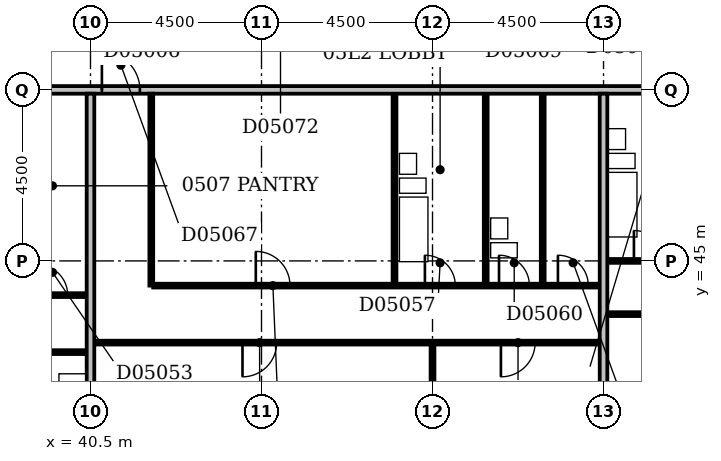
"""IFC4 building model, lengths in metres.
Left out: names, types, materials, properties, quantities, classifications, styles, units other than length and angle.
Written with IfcOpenShell. Run it as: python <this file> out.ifc"""

import sys

from ifc_helpers import new_model, si_unit, direction, frame, frame_2d, origin, place, context, subcontext, project, spatial, rectangle, extrude, element, fill, save


model = new_model("IFC4")
c1 = context("Model", 3, precision=1e-05, world=origin(), true_north=direction((0.0, 1.0)))
c2 = subcontext(c1, "Body", "Model", "MODEL_VIEW")
j1 = project(units=[si_unit("LENGTHUNIT", "METRE"), si_unit("PLANEANGLEUNIT", "RADIAN")], contexts=[c1])
p1 = place(None, origin())
s1 = spatial("IfcSite", under=j1, at=p1, CompositionType="ELEMENT")
p2 = place(p1, origin())
s2 = spatial("IfcBuilding", under=s1, at=p2, CompositionType="ELEMENT")
p3 = place(p2, frame((0.0, 0.0, 29.0)))
s3 = spatial("IfcBuildingStorey", under=s2, at=p3, CompositionType="ELEMENT", Elevation=29.0)
p4 = place(p3, frame((40.5, 36.6, 0.0), z_axis=(0.0, 0.0, 1.0), x_axis=(0.0, 1.0, 0.0)))
e1 = element("IfcWall", 1, at=p4, inside=s3, PredefinedType="PARTITIONING", context=c2, shape_type="SweptSolid", body=[
    extrude(rectangle(XDim=12.8, YDim=0.2, at=frame_2d((6.4, 0.0))), origin(), (0.0, 0.0, 1.0), 3.3),
])
p5 = place(p3, frame((49.5, 36.6, 0.0), z_axis=(0.0, 0.0, 1.0), x_axis=(0.0, 1.0, 0.0)))
e2 = element("IfcWall", 2, at=p5, inside=s3, PredefinedType="PARTITIONING", context=c2, shape_type="SweptSolid", body=[
    extrude(rectangle(XDim=6.2, YDim=0.1, at=frame_2d((3.1, 0.0))), origin(), (0.0, 0.0, 1.0), 3.3),
])
p6 = place(p3, frame((54.0, 36.6, 0.0), z_axis=(0.0, 0.0, 1.0), x_axis=(0.0, 1.0, 0.0)))
e3 = element("IfcWall", 3, at=p6, inside=s3, PredefinedType="PARTITIONING", context=c2, shape_type="SweptSolid", body=[
    extrude(rectangle(XDim=12.8, YDim=0.2, at=frame_2d((6.4, 0.0))), origin(), (0.0, 0.0, 1.0), 2.6),
])
p7 = place(p3, frame((22.6, 42.6, 0.0), z_axis=(0.0, 0.0, 1.0), x_axis=(1.0, 0.0, 0.0)))
e4 = element("IfcWall", 4, at=p7, inside=s3, PredefinedType="PARTITIONING", context=c2, shape_type="SweptSolid", body=[
    extrude(rectangle(XDim=17.8, YDim=0.1, at=frame_2d((8.9, 0.0))), origin(), (0.0, 0.0, 1.0), 3.3),
])
p8 = place(p7, frame((3.9, 0.0, 0.0)))
e5 = element("IfcOpeningElement", 5, at=p8, cuts=e4, PredefinedType="OPENING", context=c2, shape_type="SweptSolid", body=[
    extrude(rectangle(XDim=0.9, YDim=2.1, at=frame_2d((0.45, 1.05))), frame((0.0, 0.062, 0.0), z_axis=(0.0, -1.0, 0.0), x_axis=(1.0, 0.0, 0.0)), (0.0, 0.0, 1.0), 0.124),
])
p9 = place(p7, frame((10.7, 0.0, 0.0)))
e6 = element("IfcOpeningElement", 6, at=p9, cuts=e4, PredefinedType="OPENING", context=c2, shape_type="SweptSolid", body=[
    extrude(rectangle(XDim=0.9, YDim=2.1, at=frame_2d((0.45, 1.05))), frame((0.0, 0.062, 0.0), z_axis=(0.0, -1.0, 0.0), x_axis=(1.0, 0.0, 0.0)), (0.0, 0.0, 1.0), 0.124),
])
p10 = place(p7, frame((14.05, 0.0, 0.0)))
e7 = element("IfcOpeningElement", 7, at=p10, cuts=e4, PredefinedType="OPENING", context=c2, shape_type="SweptSolid", body=[
    extrude(rectangle(XDim=0.9, YDim=2.1, at=frame_2d((0.45, 1.05))), frame((0.0, 0.062, 0.0), z_axis=(0.0, -1.0, 0.0), x_axis=(1.0, 0.0, 0.0)), (0.0, 0.0, 1.0), 0.124),
])
p11 = place(p3, frame((40.6, 42.85, 0.0), z_axis=(0.0, 0.0, 1.0), x_axis=(1.0, 0.0, 0.0)))
e8 = element("IfcWall", 8, at=p11, inside=s3, PredefinedType="PARTITIONING", context=c2, shape_type="SweptSolid", body=[
    extrude(rectangle(XDim=13.3, YDim=0.1, at=frame_2d((6.65, 0.0))), origin(), (0.0, 0.0, 1.0), 3.3),
])
p12 = place(p11, frame((3.9, 0.0, 0.0)))
e9 = element("IfcOpeningElement", 9, at=p12, cuts=e8, PredefinedType="OPENING", context=c2, shape_type="SweptSolid", body=[
    extrude(rectangle(XDim=0.9, YDim=2.1, at=frame_2d((0.45, 1.05))), frame((0.0, 0.062, 0.0), z_axis=(0.0, -1.0, 0.0), x_axis=(1.0, 0.0, 0.0)), (0.0, 0.0, 1.0), 0.124),
])
p13 = place(p11, frame((10.7, 0.0, 0.0)))
e10 = element("IfcOpeningElement", 10, at=p13, cuts=e8, PredefinedType="OPENING", context=c2, shape_type="SweptSolid", body=[
    extrude(rectangle(XDim=0.9, YDim=2.1, at=frame_2d((0.45, 1.05))), frame((0.0, 0.062, 0.0), z_axis=(0.0, -1.0, 0.0), x_axis=(1.0, 0.0, 0.0)), (0.0, 0.0, 1.0), 0.124),
])
p14 = place(p3, frame((54.1, 43.6, 0.0), z_axis=(0.0, 0.0, 1.0), x_axis=(1.0, 0.0, 0.0)))
e11 = element("IfcWall", 11, at=p14, inside=s3, PredefinedType="PARTITIONING", context=c2, shape_type="SweptSolid", body=[
    extrude(rectangle(XDim=8.8, YDim=0.1, at=frame_2d((4.4, 0.0))), origin(), (0.0, 0.0, 1.0), 3.3),
])
p15 = place(p14, frame((1.7, 0.0, 0.0)))
e12 = element("IfcOpeningElement", 12, at=p15, cuts=e11, PredefinedType="OPENING", context=c2, shape_type="SweptSolid", body=[
    extrude(rectangle(XDim=0.9, YDim=2.1, at=frame_2d((0.45, 1.05))), frame((0.0, 0.062, 0.0), z_axis=(0.0, -1.0, 0.0), x_axis=(1.0, 0.0, 0.0)), (0.0, 0.0, 1.0), 0.124),
])
p16 = place(p14, frame((6.2, 0.0, 0.0)))
e13 = element("IfcOpeningElement", 13, at=p16, cuts=e11, PredefinedType="OPENING", context=c2, shape_type="SweptSolid", body=[
    extrude(rectangle(XDim=0.9, YDim=2.1, at=frame_2d((0.45, 1.05))), frame((0.0, 0.062, 0.0), z_axis=(0.0, -1.0, 0.0), x_axis=(1.0, 0.0, 0.0)), (0.0, 0.0, 1.0), 0.124),
])
p17 = place(p3, frame((31.05, 44.1, 0.0), z_axis=(0.0, 0.0, 1.0), x_axis=(1.0, 0.0, 0.0)))
e14 = element("IfcWall", 14, at=p17, inside=s3, PredefinedType="PARTITIONING", context=c2, shape_type="SweptSolid", body=[
    extrude(rectangle(XDim=9.35, YDim=0.1, at=frame_2d((4.675, 0.0))), origin(), (0.0, 0.0, 1.0), 3.3),
])
p18 = place(p17, frame((0.75, 0.0, 0.0)))
e15 = element("IfcOpeningElement", 15, at=p18, cuts=e14, PredefinedType="OPENING", context=c2, shape_type="SweptSolid", body=[
    extrude(rectangle(XDim=0.8, YDim=2.1, at=frame_2d((0.4, 1.05))), frame((0.0, 0.062, 0.0), z_axis=(0.0, -1.0, 0.0), x_axis=(1.0, 0.0, 0.0)), (0.0, 0.0, 1.0), 0.124),
])
p19 = place(p17, frame((8.05, 0.0, 0.0)))
e16 = element("IfcOpeningElement", 16, at=p19, cuts=e14, PredefinedType="OPENING", context=c2, shape_type="SweptSolid", body=[
    extrude(rectangle(XDim=0.8, YDim=2.1, at=frame_2d((0.4, 1.05))), frame((0.0, 0.062, 0.0), z_axis=(0.0, -1.0, 0.0), x_axis=(1.0, 0.0, 0.0)), (0.0, 0.0, 1.0), 0.124),
])
p20 = place(p17, frame((4.25, 0.0, 0.0)))
e17 = element("IfcOpeningElement", 17, at=p20, cuts=e14, PredefinedType="OPENING", context=c2, shape_type="SweptSolid", body=[
    extrude(rectangle(XDim=0.8, YDim=2.1, at=frame_2d((0.4, 1.05))), frame((0.0, 0.062, 0.0), z_axis=(0.0, -1.0, 0.0), x_axis=(1.0, 0.0, 0.0)), (0.0, 0.0, 1.0), 0.124),
])
p21 = place(p17, frame((6.05, 0.0, 0.0)))
e18 = element("IfcOpeningElement", 18, at=p21, cuts=e14, PredefinedType="OPENING", context=c2, shape_type="SweptSolid", body=[
    extrude(rectangle(XDim=0.8, YDim=2.1, at=frame_2d((0.4, 1.05))), frame((0.0, 0.062, 0.0), z_axis=(0.0, -1.0, 0.0), x_axis=(1.0, 0.0, 0.0)), (0.0, 0.0, 1.0), 0.124),
])
p22 = place(p17, frame((2.7, 0.0, 0.0)))
e19 = element("IfcOpeningElement", 19, at=p22, cuts=e14, PredefinedType="OPENING", context=c2, shape_type="SweptSolid", body=[
    extrude(rectangle(XDim=0.8, YDim=2.1, at=frame_2d((0.4, 1.05))), frame((0.0, 0.062, 0.0), z_axis=(0.0, -1.0, 0.0), x_axis=(1.0, 0.0, 0.0)), (0.0, 0.0, 1.0), 0.124),
])
p23 = place(p3, frame((42.1, 44.35, 0.0), z_axis=(0.0, 0.0, 1.0), x_axis=(0.0, 1.0, 0.0)))
e20 = element("IfcWall", 20, at=p23, inside=s3, PredefinedType="PARTITIONING", context=c2, shape_type="SweptSolid", body=[
    extrude(rectangle(XDim=5.05, YDim=0.1, at=frame_2d((2.525, 0.0))), origin(), (0.0, 0.0, 1.0), 3.3),
])
p24 = place(p3, frame((42.15, 44.35, 0.0), z_axis=(0.0, 0.0, 1.0), x_axis=(1.0, 0.0, 0.0)))
e21 = element("IfcWall", 21, at=p24, inside=s3, PredefinedType="PARTITIONING", context=c2, shape_type="SweptSolid", body=[
    extrude(rectangle(XDim=11.75, YDim=0.1, at=frame_2d((5.875, 0.0))), origin(), (0.0, 0.0, 1.0), 3.3),
])
p25 = place(p24, frame((7.15, 0.0, 0.0)))
e22 = element("IfcOpeningElement", 22, at=p25, cuts=e21, PredefinedType="OPENING", context=c2, shape_type="SweptSolid", body=[
    extrude(rectangle(XDim=0.8, YDim=2.1, at=frame_2d((0.4, 1.05))), frame((0.0, 0.062, 0.0), z_axis=(0.0, -1.0, 0.0), x_axis=(1.0, 0.0, 0.0)), (0.0, 0.0, 1.0), 0.124),
])
p26 = place(p24, frame((2.7, 0.0, 0.0)))
e23 = element("IfcOpeningElement", 23, at=p26, cuts=e21, PredefinedType="OPENING", context=c2, shape_type="SweptSolid", body=[
    extrude(rectangle(XDim=0.9, YDim=2.1, at=frame_2d((0.45, 1.05))), frame((0.0, 0.062, 0.0), z_axis=(0.0, -1.0, 0.0), x_axis=(1.0, 0.0, 0.0)), (0.0, 0.0, 1.0), 0.124),
])
p27 = place(p24, frame((10.65, 0.0, 0.0)))
e24 = element("IfcOpeningElement", 24, at=p27, cuts=e21, PredefinedType="OPENING", context=c2, shape_type="SweptSolid", body=[
    extrude(rectangle(XDim=0.8, YDim=2.1, at=frame_2d((0.4, 1.05))), frame((0.0, 0.062, 0.0), z_axis=(0.0, -1.0, 0.0), x_axis=(1.0, 0.0, 0.0)), (0.0, 0.0, 1.0), 0.124),
])
p28 = place(p24, frame((9.1, 0.0, 0.0)))
e25 = element("IfcOpeningElement", 25, at=p28, cuts=e21, PredefinedType="OPENING", context=c2, shape_type="SweptSolid", body=[
    extrude(rectangle(XDim=0.8, YDim=2.1, at=frame_2d((0.4, 1.05))), frame((0.0, 0.062, 0.0), z_axis=(0.0, -1.0, 0.0), x_axis=(1.0, 0.0, 0.0)), (0.0, 0.0, 1.0), 0.124),
])
for number, where, z_axis, x_axis in (
    (26, (48.5, 44.4, 0.0), (0.0, 0.0, 1.0), (0.0, 1.0, 0.0)),
    (27, (50.9, 44.4, 0.0), (0.0, 0.0, 1.0), (0.0, 1.0, 0.0)),
    (28, (52.4, 44.4, 0.0), (0.0, 0.0, 1.0), (0.0, 1.0, 0.0)),
):
    element("IfcWall", number, at=place(p3, frame(where, z_axis=z_axis, x_axis=x_axis)), inside=s3, PredefinedType="PLUMBINGWALL", context=c2, shape_type="SweptSolid", body=[
        extrude(rectangle(XDim=5.0, YDim=0.1, at=frame_2d((2.5, 0.0))), origin(), (0.0, 0.0, 1.0), 3.3),
    ])
p29 = place(p3, frame((54.1, 45.0, 0.0), z_axis=(0.0, 0.0, 1.0), x_axis=(1.0, 0.0, 0.0)))
e29 = element("IfcWall", 29, at=p29, inside=s3, PredefinedType="PARTITIONING", context=c2, shape_type="SweptSolid", body=[
    extrude(rectangle(XDim=2.25, YDim=0.1, at=frame_2d((1.125, 0.0))), origin(), (0.0, 0.0, 1.0), 3.3),
])
p30 = place(p29, frame((0.7, 0.0, 0.0)))
e30 = element("IfcOpeningElement", 30, at=p30, cuts=e29, PredefinedType="OPENING", context=c2, shape_type="SweptSolid", body=[
    extrude(rectangle(XDim=0.8, YDim=2.1, at=frame_2d((0.4, 1.05))), frame((0.0, 0.062, 0.0), z_axis=(0.0, -1.0, 0.0), x_axis=(1.0, 0.0, 0.0)), (0.0, 0.0, 1.0), 0.124),
])
p31 = place(p3, frame((9.1, 49.5, 0.0), z_axis=(0.0, 0.0, 1.0), x_axis=(1.0, 0.0, 0.0)))
e31 = element("IfcWall", 31, at=p31, inside=s3, PredefinedType="PARTITIONING", context=c2, shape_type="SweptSolid", body=[
    extrude(rectangle(XDim=57.8, YDim=0.2, at=frame_2d((28.9, 0.0))), origin(), (0.0, 0.0, 1.0), 3.3),
])
p32 = place(p31, frame((20.6, 0.0, 0.0)))
e32 = element("IfcOpeningElement", 32, at=p32, cuts=e31, PredefinedType="OPENING", context=c2, shape_type="SweptSolid", body=[
    extrude(rectangle(XDim=1.0, YDim=2.1, at=frame_2d((0.5, 1.05))), frame((0.0, 0.112, 0.0), z_axis=(0.0, -1.0, 0.0), x_axis=(1.0, 0.0, 0.0)), (0.0, 0.0, 1.0), 0.224),
])
p33 = place(p31, frame((31.7, 0.0, 0.0)))
e33 = element("IfcOpeningElement", 33, at=p33, cuts=e31, PredefinedType="OPENING", context=c2, shape_type="SweptSolid", body=[
    extrude(rectangle(XDim=1.0, YDim=2.1, at=frame_2d((0.5, 1.05))), frame((0.0, 0.112, 0.0), z_axis=(0.0, -1.0, 0.0), x_axis=(1.0, 0.0, 0.0)), (0.0, 0.0, 1.0), 0.224),
])
p34 = place(p31, frame((47.6, 0.0, 0.0)))
e34 = element("IfcOpeningElement", 34, at=p34, cuts=e31, PredefinedType="OPENING", context=c2, shape_type="SweptSolid", body=[
    extrude(rectangle(XDim=1.0, YDim=2.1, at=frame_2d((0.5, 1.05))), frame((0.0, 0.112, 0.0), z_axis=(0.0, -1.0, 0.0), x_axis=(1.0, 0.0, 0.0)), (0.0, 0.0, 1.0), 0.224),
])
p35 = place(p31, frame((54.15, 0.0, 0.0)))
e35 = element("IfcOpeningElement", 35, at=p35, cuts=e31, PredefinedType="OPENING", context=c2, shape_type="SweptSolid", body=[
    extrude(rectangle(XDim=1.0, YDim=2.1, at=frame_2d((0.5, 1.05))), frame((0.0, 0.112, 0.0), z_axis=(0.0, -1.0, 0.0), x_axis=(1.0, 0.0, 0.0)), (0.0, 0.0, 1.0), 0.224),
])
p36 = place(p31, frame((10.65, 0.0, 0.0)))
e36 = element("IfcOpeningElement", 36, at=p36, cuts=e31, PredefinedType="OPENING", context=c2, shape_type="SweptSolid", body=[
    extrude(rectangle(XDim=0.9, YDim=2.1, at=frame_2d((0.45, 1.05))), frame((0.0, 0.112, 0.0), z_axis=(0.0, -1.0, 0.0), x_axis=(1.0, 0.0, 0.0)), (0.0, 0.0, 1.0), 0.224),
])
p37 = place(p12, frame((0.9, 0.0, 0.0), z_axis=(0.0, 0.0, 1.0), x_axis=(-1.0, 0.0, 0.0)))
e37 = element("IfcDoor", 37, at=p37, inside=s3, OperationType="SINGLE_SWING_RIGHT", PredefinedType="DOOR", context=c2, shape_type="SweptSolid", body=[
    extrude(rectangle(XDim=0.9, YDim=2.1, at=frame_2d((0.45, 1.05))), frame((0.0, 0.025, 0.0), z_axis=(0.0, -1.0, 0.0), x_axis=(1.0, 0.0, 0.0)), (0.0, 0.0, 1.0), 0.05),
])
fill(e9, e37)
p38 = place(p13, frame((0.9, 0.0, 0.0), z_axis=(0.0, 0.0, 1.0), x_axis=(-1.0, 0.0, 0.0)))
e38 = element("IfcDoor", 38, at=p38, inside=s3, OperationType="SINGLE_SWING_RIGHT", PredefinedType="DOOR", context=c2, shape_type="SweptSolid", body=[
    extrude(rectangle(XDim=0.9, YDim=2.1, at=frame_2d((0.45, 1.05))), frame((0.0, 0.025, 0.0), z_axis=(0.0, -1.0, 0.0), x_axis=(1.0, 0.0, 0.0)), (0.0, 0.0, 1.0), 0.05),
])
fill(e10, e38)
p39 = place(p19, origin())
e39 = element("IfcDoor", 39, at=p39, inside=s3, OperationType="SINGLE_SWING_LEFT", PredefinedType="DOOR", context=c2, shape_type="SweptSolid", body=[
    extrude(rectangle(XDim=0.8, YDim=2.1, at=frame_2d((0.4, 1.05))), frame((0.0, 0.025, 0.0), z_axis=(0.0, -1.0, 0.0), x_axis=(1.0, 0.0, 0.0)), (0.0, 0.0, 1.0), 0.05),
])
fill(e16, e39)
p40 = place(p25, origin())
e40 = element("IfcDoor", 40, at=p40, inside=s3, OperationType="SINGLE_SWING_LEFT", PredefinedType="DOOR", context=c2, shape_type="SweptSolid", body=[
    extrude(rectangle(XDim=0.8, YDim=2.1, at=frame_2d((0.4, 1.05))), frame((0.0, 0.025, 0.0), z_axis=(0.0, -1.0, 0.0), x_axis=(1.0, 0.0, 0.0)), (0.0, 0.0, 1.0), 0.05),
])
fill(e22, e40)
p41 = place(p26, origin())
e41 = element("IfcDoor", 41, at=p41, inside=s3, OperationType="SINGLE_SWING_LEFT", PredefinedType="DOOR", context=c2, shape_type="SweptSolid", body=[
    extrude(rectangle(XDim=0.9, YDim=2.1, at=frame_2d((0.45, 1.05))), frame((0.0, 0.025, 0.0), z_axis=(0.0, -1.0, 0.0), x_axis=(1.0, 0.0, 0.0)), (0.0, 0.0, 1.0), 0.05),
])
fill(e23, e41)
p42 = place(p27, origin())
e42 = element("IfcDoor", 42, at=p42, inside=s3, OperationType="SINGLE_SWING_LEFT", PredefinedType="DOOR", context=c2, shape_type="SweptSolid", body=[
    extrude(rectangle(XDim=0.8, YDim=2.1, at=frame_2d((0.4, 1.05))), frame((0.0, 0.025, 0.0), z_axis=(0.0, -1.0, 0.0), x_axis=(1.0, 0.0, 0.0)), (0.0, 0.0, 1.0), 0.05),
])
fill(e24, e42)
p43 = place(p28, origin())
e43 = element("IfcDoor", 43, at=p43, inside=s3, OperationType="SINGLE_SWING_LEFT", PredefinedType="DOOR", context=c2, shape_type="SweptSolid", body=[
    extrude(rectangle(XDim=0.8, YDim=2.1, at=frame_2d((0.4, 1.05))), frame((0.0, 0.025, 0.0), z_axis=(0.0, -1.0, 0.0), x_axis=(1.0, 0.0, 0.0)), (0.0, 0.0, 1.0), 0.05),
])
fill(e25, e43)
p44 = place(p30, origin())
e44 = element("IfcDoor", 44, at=p44, inside=s3, OperationType="SINGLE_SWING_LEFT", PredefinedType="DOOR", context=c2, shape_type="SweptSolid", body=[
    extrude(rectangle(XDim=0.8, YDim=2.1, at=frame_2d((0.4, 1.05))), frame((0.0, 0.025, 0.0), z_axis=(0.0, -1.0, 0.0), x_axis=(1.0, 0.0, 0.0)), (0.0, 0.0, 1.0), 0.05),
])
fill(e30, e44)
p45 = place(p33, origin())
e45 = element("IfcDoor", 45, at=p45, inside=s3, OperationType="SINGLE_SWING_LEFT", PredefinedType="DOOR", context=c2, shape_type="SweptSolid", body=[
    extrude(rectangle(XDim=1.0, YDim=2.1, at=frame_2d((0.5, 1.05))), frame((0.0, 0.025, 0.0), z_axis=(0.0, -1.0, 0.0), x_axis=(1.0, 0.0, 0.0)), (0.0, 0.0, 1.0), 0.05),
])
fill(e33, e45)
save(model, sys.argv[1])
